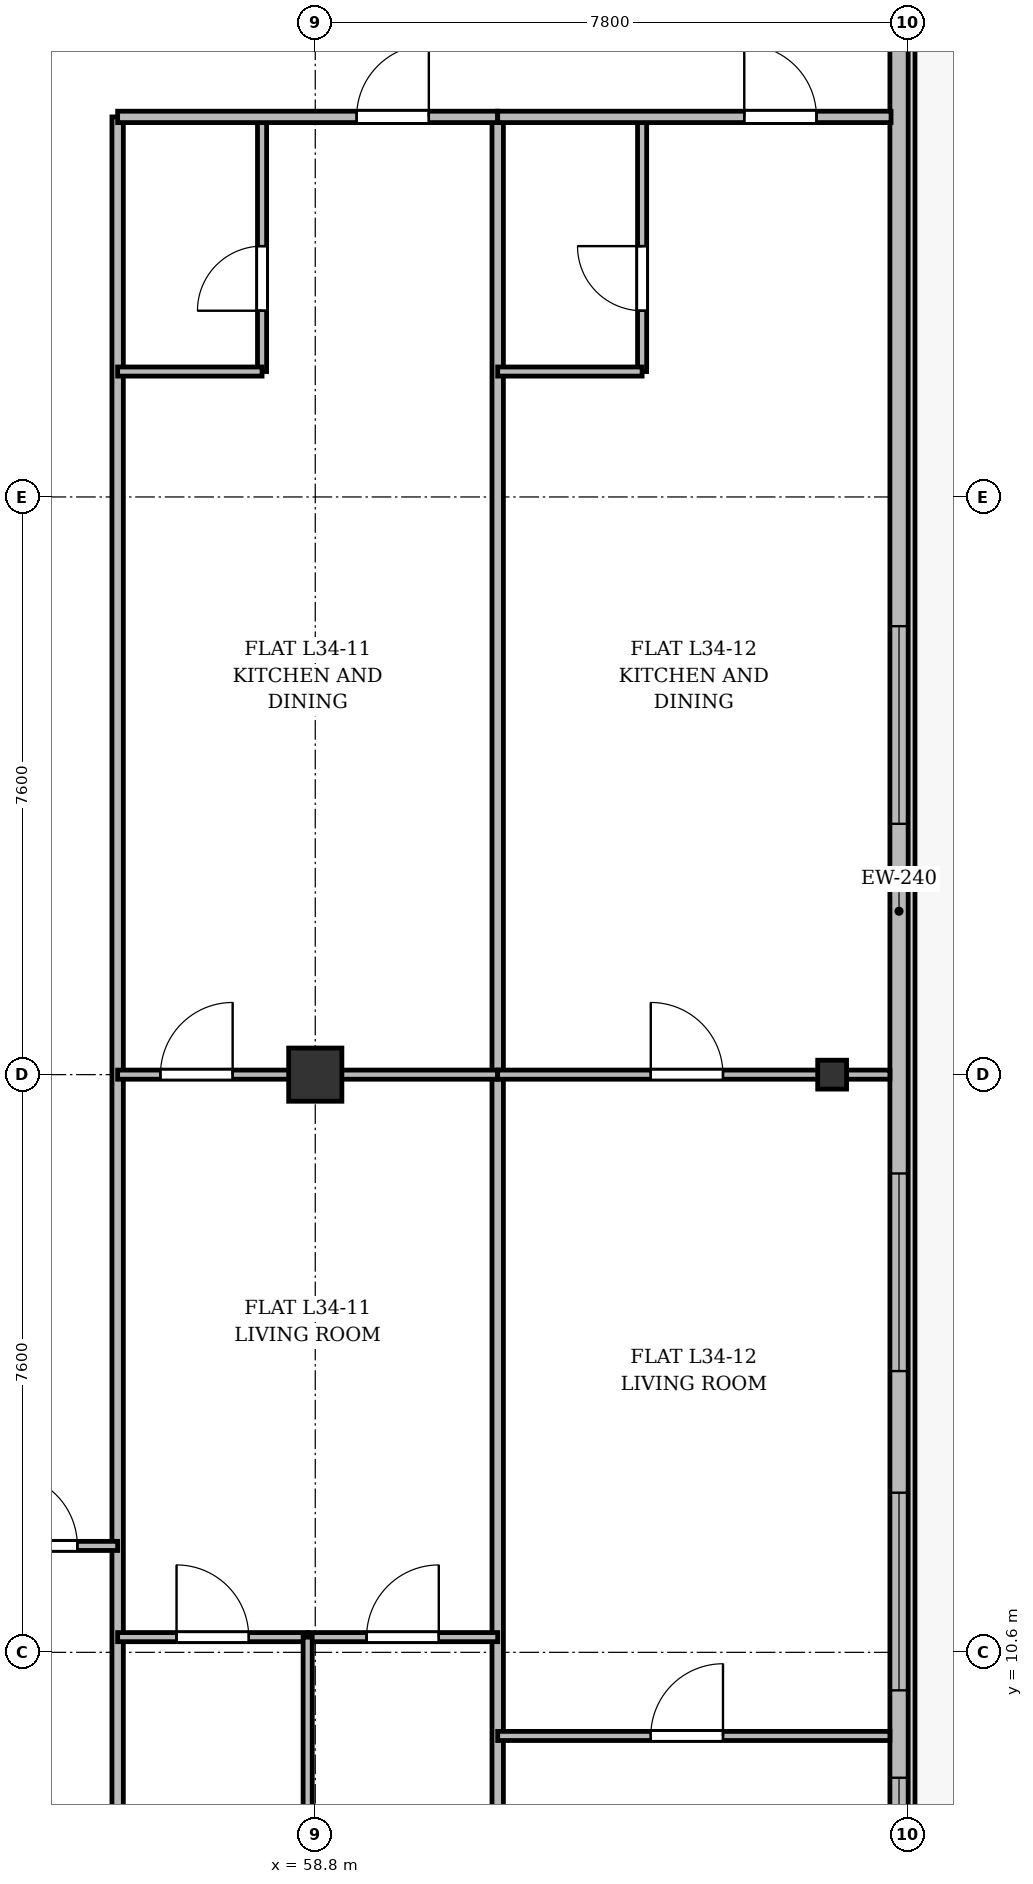
"""IFC4 building model, lengths in metres.
Left out: names, types, materials, properties, quantities, classifications, styles, units other than length and angle.
Written with IfcOpenShell. Run it as: python <this file> out.ifc"""

import sys

from ifc_helpers import new_model, si_unit, direction, frame, frame_2d, origin, origin_2d, place, context, subcontext, project, spatial, rectangle, i_section, extrude, source, transform, mapped, element, fill, save


model = new_model("IFC4")
c1 = context("Model", 3, precision=1e-05, world=origin(), true_north=direction((0.0, 1.0)))
c2 = subcontext(c1, "Body", "Model", "MODEL_VIEW")
j1 = project(units=[si_unit("LENGTHUNIT", "METRE"), si_unit("PLANEANGLEUNIT", "RADIAN")], contexts=[c1])
p1 = place(None, origin())
s1 = spatial("IfcSite", under=j1, at=p1, CompositionType="ELEMENT")
p2 = place(p1, origin())
s2 = spatial("IfcBuilding", under=s1, at=p2, CompositionType="ELEMENT")
p3 = place(p2, frame((0.0, 0.0, 132.1)))
s3 = spatial("IfcBuildingStorey", under=s2, at=p3, CompositionType="ELEMENT", Elevation=132.1)
m1 = source(origin(), c2, "Body", "SweptSolid", [
    extrude(rectangle(XDim=0.7, YDim=0.7, at=origin_2d()), origin(), (0.0, 0.0, 1.0), 3.6),
])
p4 = place(p3, frame((58.8, 18.2, 0.0), z_axis=(0.0, 0.0, 1.0), x_axis=(1.0, 0.0, 0.0)))
e1 = element("IfcColumn", 1, at=p4, inside=s3, PredefinedType="COLUMN", context=c2, shape_type="MappedRepresentation", body=[
    mapped(m1, transform((0.0, 0.0, 0.0), x_axis=(1.0, 0.0, 0.0), y_axis=(0.0, 1.0, 0.0), z_axis=(0.0, 0.0, 1.0), scale=1.0)),
])
m2 = source(origin(), c2, "Body", "SweptSolid", [
    extrude(i_section(OverallWidth=0.38, OverallDepth=0.38, WebThickness=0.02, FlangeThickness=0.03, at=origin_2d()), origin(), (0.0, 0.0, 1.0), 3.6),
])
p5 = place(p3, frame((65.6, 18.2, 0.0), z_axis=(0.0, 0.0, 1.0), x_axis=(1.0, 0.0, 0.0)))
e2 = element("IfcColumn", 2, at=p5, inside=s3, PredefinedType="COLUMN", context=c2, shape_type="MappedRepresentation", body=[
    mapped(m2, transform((0.0, 0.0, 0.0), x_axis=(1.0, 0.0, 0.0), y_axis=(0.0, 1.0, 0.0), z_axis=(0.0, 0.0, 1.0), scale=1.0)),
])
p6 = place(p3, frame((66.48, 45.5, 0.0), z_axis=(0.0, 0.0, 1.0), x_axis=(0.0, -1.0, 0.0)))
e3 = element("IfcWall", 3, at=p6, inside=s3, PredefinedType="SOLIDWALL", context=c2, shape_type="SweptSolid", body=[
    extrude(rectangle(XDim=39.2, YDim=0.24, at=frame_2d((19.6, 0.0))), origin(), (0.0, 0.0, 1.0), 3.35),
])
p7 = place(p6, frame((9.6, 0.0, 0.0)))
e4 = element("IfcOpeningElement", 4, at=p7, cuts=e3, PredefinedType="OPENING", context=c2, shape_type="SweptSolid", body=[
    extrude(rectangle(XDim=1.2, YDim=2.2, at=frame_2d((0.6, 1.1))), frame((0.0, 0.13, 0.0), z_axis=(0.0, -1.0, 0.0), x_axis=(1.0, 0.0, 0.0)), (0.0, 0.0, 1.0), 0.26),
])
p8 = place(p6, frame((36.55, 0.0, 0.92)))
e5 = element("IfcOpeningElement", 5, at=p8, cuts=e3, PredefinedType="OPENING", context=c2, shape_type="SweptSolid", body=[
    extrude(rectangle(XDim=1.2, YDim=1.65, at=frame_2d((0.6, 0.825))), frame((0.0, 0.13, 0.0), z_axis=(0.0, -1.0, 0.0), x_axis=(1.0, 0.0, 0.0)), (0.0, 0.0, 1.0), 0.26),
])
p9 = place(p6, frame((32.8, 0.0, 0.92)))
e6 = element("IfcOpeningElement", 6, at=p9, cuts=e3, PredefinedType="OPENING", context=c2, shape_type="SweptSolid", body=[
    extrude(rectangle(XDim=2.6, YDim=1.9, at=frame_2d((1.3, 0.95))), frame((0.0, 0.13, 0.0), z_axis=(0.0, -1.0, 0.0), x_axis=(1.0, 0.0, 0.0)), (0.0, 0.0, 1.0), 0.26),
])
p10 = place(p6, frame((28.6, 0.0, 0.92)))
e7 = element("IfcOpeningElement", 7, at=p10, cuts=e3, PredefinedType="OPENING", context=c2, shape_type="SweptSolid", body=[
    extrude(rectangle(XDim=2.6, YDim=1.9, at=frame_2d((1.3, 0.95))), frame((0.0, 0.13, 0.0), z_axis=(0.0, -1.0, 0.0), x_axis=(1.0, 0.0, 0.0)), (0.0, 0.0, 1.0), 0.26),
])
p11 = place(p6, frame((21.4, 0.0, 0.92)))
e8 = element("IfcOpeningElement", 8, at=p11, cuts=e3, PredefinedType="OPENING", context=c2, shape_type="SweptSolid", body=[
    extrude(rectangle(XDim=2.6, YDim=1.9, at=frame_2d((1.3, 0.95))), frame((0.0, 0.13, 0.0), z_axis=(0.0, -1.0, 0.0), x_axis=(1.0, 0.0, 0.0)), (0.0, 0.0, 1.0), 0.26),
])
p12 = place(p6, frame((4.5, 0.0, 0.92)))
e9 = element("IfcOpeningElement", 9, at=p12, cuts=e3, PredefinedType="OPENING", context=c2, shape_type="SweptSolid", body=[
    extrude(rectangle(XDim=1.2, YDim=1.65, at=frame_2d((0.6, 0.825))), frame((0.0, 0.13, 0.0), z_axis=(0.0, -1.0, 0.0), x_axis=(1.0, 0.0, 0.0)), (0.0, 0.0, 1.0), 0.26),
])
p13 = place(p6, frame((1.15, 0.0, 0.92)))
e10 = element("IfcOpeningElement", 10, at=p13, cuts=e3, PredefinedType="OPENING", context=c2, shape_type="SweptSolid", body=[
    extrude(rectangle(XDim=1.2, YDim=1.65, at=frame_2d((0.6, 0.825))), frame((0.0, 0.13, 0.0), z_axis=(0.0, -1.0, 0.0), x_axis=(1.0, 0.0, 0.0)), (0.0, 0.0, 1.0), 0.26),
])
for number, where, z_axis, x_axis in (
    (11, (61.2, 3.525, 0.0), (0.0, 0.0, 1.0), (0.0, 1.0, 0.0)),
    (12, (56.2, 3.525, 0.0), (0.0, 0.0, 1.0), (0.0, 1.0, 0.0)),
):
    element("IfcWall", number, at=place(p3, frame(where, z_axis=z_axis, x_axis=x_axis)), inside=s3, PredefinedType="PARTITIONING", context=c2, shape_type="SweptSolid", body=[
        extrude(rectangle(XDim=27.275, YDim=0.15, at=frame_2d((13.638, 0.0))), origin(), (0.0, 0.0, 1.0), 2.75),
    ])
p14 = place(p3, frame((54.2, 12.0, 0.0), z_axis=(0.0, 0.0, 1.0), x_axis=(1.0, 0.0, 0.0)))
e13 = element("IfcWall", 13, at=p14, inside=s3, PredefinedType="PARTITIONING", context=c2, shape_type="SweptSolid", body=[
    extrude(rectangle(XDim=2.0, YDim=0.12, at=frame_2d((1.0, 0.0))), origin(), (0.0, 0.0, 1.0), 3.35),
])
p15 = place(p14, frame((0.52, 0.0, 0.0)))
e14 = element("IfcOpeningElement", 14, at=p15, cuts=e13, PredefinedType="OPENING", context=c2, shape_type="SweptSolid", body=[
    extrude(rectangle(XDim=0.95, YDim=2.15, at=frame_2d((0.475, 1.075))), frame((0.0, 0.07, 0.0), z_axis=(0.0, -1.0, 0.0), x_axis=(1.0, 0.0, 0.0)), (0.0, 0.0, 1.0), 0.14),
])
p16 = place(p3, frame((56.2, 18.2, 0.0), z_axis=(0.0, 0.0, 1.0), x_axis=(1.0, 0.0, 0.0)))
e15 = element("IfcWall", 15, at=p16, inside=s3, PredefinedType="PARTITIONING", context=c2, shape_type="SweptSolid", body=[
    extrude(rectangle(XDim=5.0, YDim=0.12, at=frame_2d((2.5, 0.0))), origin(), (0.0, 0.0, 1.0), 2.75),
])
p17 = place(p16, frame((0.563, 0.0, 0.0)))
e16 = element("IfcOpeningElement", 16, at=p17, cuts=e15, PredefinedType="OPENING", context=c2, shape_type="SweptSolid", body=[
    extrude(rectangle(XDim=0.95, YDim=2.15, at=frame_2d((0.475, 1.075))), frame((0.0, 0.07, 0.0), z_axis=(0.0, -1.0, 0.0), x_axis=(1.0, 0.0, 0.0)), (0.0, 0.0, 1.0), 0.14),
])
p18 = place(p3, frame((58.1, 27.45, 0.0), z_axis=(0.0, 0.0, 1.0), x_axis=(0.0, 1.0, 0.0)))
e17 = element("IfcWall", 17, at=p18, inside=s3, PredefinedType="PARTITIONING", context=c2, shape_type="SweptSolid", body=[
    extrude(rectangle(XDim=3.35, YDim=0.12, at=frame_2d((1.675, 0.0))), origin(), (0.0, 0.0, 1.0), 3.35),
])
p19 = place(p18, frame((0.8, 0.0, 0.0)))
e18 = element("IfcOpeningElement", 18, at=p19, cuts=e17, PredefinedType="OPENING", context=c2, shape_type="SweptSolid", body=[
    extrude(rectangle(XDim=0.85, YDim=2.1, at=frame_2d((0.425, 1.05))), frame((0.0, 0.07, 0.0), z_axis=(0.0, -1.0, 0.0), x_axis=(1.0, 0.0, 0.0)), (0.0, 0.0, 1.0), 0.14),
])
p20 = place(p3, frame((56.2, 27.45, 0.0), z_axis=(0.0, 0.0, 1.0), x_axis=(1.0, 0.0, 0.0)))
e19 = element("IfcWall", 19, at=p20, inside=s3, PredefinedType="PARTITIONING", context=c2, shape_type="SweptSolid", body=[
    extrude(rectangle(XDim=1.9, YDim=0.12, at=frame_2d((0.95, 0.0))), origin(), (0.0, 0.0, 1.0), 3.35),
])
p21 = place(p3, frame((56.2, 30.8, 0.0), z_axis=(0.0, 0.0, 1.0), x_axis=(1.0, 0.0, 0.0)))
e20 = element("IfcWall", 20, at=p21, inside=s3, PredefinedType="PARTITIONING", context=c2, shape_type="SweptSolid", body=[
    extrude(rectangle(XDim=5.0, YDim=0.15, at=frame_2d((2.5, 0.0))), origin(), (0.0, 0.0, 1.0), 2.85),
])
p22 = place(p21, frame((3.144, 0.0, 0.0)))
e21 = element("IfcOpeningElement", 21, at=p22, cuts=e20, PredefinedType="OPENING", context=c2, shape_type="SweptSolid", body=[
    extrude(rectangle(XDim=0.95, YDim=2.15, at=frame_2d((0.475, 1.075))), frame((0.0, 0.085, 0.0), z_axis=(0.0, -1.0, 0.0), x_axis=(1.0, 0.0, 0.0)), (0.0, 0.0, 1.0), 0.17),
])
p23 = place(p3, frame((56.2, 10.8, 0.0), z_axis=(0.0, 0.0, 1.0), x_axis=(1.0, 0.0, 0.0)))
e22 = element("IfcWall", 22, at=p23, inside=s3, PredefinedType="PARTITIONING", context=c2, shape_type="SweptSolid", body=[
    extrude(rectangle(XDim=2.5, YDim=0.12, at=frame_2d((1.25, 0.0))), origin(), (0.0, 0.0, 1.0), 3.0),
])
p24 = place(p23, frame((0.775, 0.0, 0.0)))
e23 = element("IfcOpeningElement", 23, at=p24, cuts=e22, PredefinedType="OPENING", context=c2, shape_type="SweptSolid", body=[
    extrude(rectangle(XDim=0.95, YDim=2.15, at=frame_2d((0.475, 1.075))), frame((0.0, 0.07, 0.0), z_axis=(0.0, -1.0, 0.0), x_axis=(1.0, 0.0, 0.0)), (0.0, 0.0, 1.0), 0.14),
])
p25 = place(p3, frame((58.7, 10.8, 0.0), z_axis=(0.0, 0.0, 1.0), x_axis=(1.0, 0.0, 0.0)))
e24 = element("IfcWall", 24, at=p25, inside=s3, PredefinedType="PARTITIONING", context=c2, shape_type="SweptSolid", body=[
    extrude(rectangle(XDim=2.5, YDim=0.12, at=frame_2d((1.25, 0.0))), origin(), (0.0, 0.0, 1.0), 2.85),
])
p26 = place(p25, frame((0.775, 0.0, 0.0)))
e25 = element("IfcOpeningElement", 25, at=p26, cuts=e24, PredefinedType="OPENING", context=c2, shape_type="SweptSolid", body=[
    extrude(rectangle(XDim=0.95, YDim=2.15, at=frame_2d((0.475, 1.075))), frame((0.0, 0.07, 0.0), z_axis=(0.0, -1.0, 0.0), x_axis=(1.0, 0.0, 0.0)), (0.0, 0.0, 1.0), 0.14),
])
p27 = place(p3, frame((58.7, 3.525, 0.0), z_axis=(0.0, 0.0, 1.0), x_axis=(0.0, 1.0, 0.0)))
e26 = element("IfcWall", 26, at=p27, inside=s3, PredefinedType="PARTITIONING", context=c2, shape_type="SweptSolid", body=[
    extrude(rectangle(XDim=7.275, YDim=0.12, at=frame_2d((3.638, 0.0))), origin(), (0.0, 0.0, 1.0), 2.75),
])
p28 = place(p3, frame((61.2, 18.2, 0.0), z_axis=(0.0, 0.0, 1.0), x_axis=(1.0, 0.0, 0.0)))
e27 = element("IfcWall", 27, at=p28, inside=s3, PredefinedType="PARTITIONING", context=c2, shape_type="SweptSolid", body=[
    extrude(rectangle(XDim=5.16, YDim=0.12, at=frame_2d((2.58, 0.0))), origin(), (0.0, 0.0, 1.0), 2.75),
])
p29 = place(p28, frame((2.014, 0.0, 0.0)))
e28 = element("IfcOpeningElement", 28, at=p29, cuts=e27, PredefinedType="OPENING", context=c2, shape_type="SweptSolid", body=[
    extrude(rectangle(XDim=0.95, YDim=2.15, at=frame_2d((0.475, 1.075))), frame((0.0, 0.07, 0.0), z_axis=(0.0, -1.0, 0.0), x_axis=(1.0, 0.0, 0.0)), (0.0, 0.0, 1.0), 0.14),
])
p30 = place(p3, frame((63.1, 27.45, 0.0), z_axis=(0.0, 0.0, 1.0), x_axis=(0.0, 1.0, 0.0)))
e29 = element("IfcWall", 29, at=p30, inside=s3, PredefinedType="PARTITIONING", context=c2, shape_type="SweptSolid", body=[
    extrude(rectangle(XDim=3.35, YDim=0.12, at=frame_2d((1.675, 0.0))), origin(), (0.0, 0.0, 1.0), 3.35),
])
p31 = place(p30, frame((0.8, 0.0, 0.0)))
e30 = element("IfcOpeningElement", 30, at=p31, cuts=e29, PredefinedType="OPENING", context=c2, shape_type="SweptSolid", body=[
    extrude(rectangle(XDim=0.85, YDim=2.1, at=frame_2d((0.425, 1.05))), frame((0.0, 0.07, 0.0), z_axis=(0.0, -1.0, 0.0), x_axis=(1.0, 0.0, 0.0)), (0.0, 0.0, 1.0), 0.14),
])
p32 = place(p3, frame((61.2, 27.45, 0.0), z_axis=(0.0, 0.0, 1.0), x_axis=(1.0, 0.0, 0.0)))
e31 = element("IfcWall", 31, at=p32, inside=s3, PredefinedType="PARTITIONING", context=c2, shape_type="SweptSolid", body=[
    extrude(rectangle(XDim=1.9, YDim=0.12, at=frame_2d((0.95, 0.0))), origin(), (0.0, 0.0, 1.0), 3.35),
])
p33 = place(p3, frame((61.2, 30.8, 0.0), z_axis=(0.0, 0.0, 1.0), x_axis=(1.0, 0.0, 0.0)))
e32 = element("IfcWall", 32, at=p33, inside=s3, PredefinedType="PARTITIONING", context=c2, shape_type="SweptSolid", body=[
    extrude(rectangle(XDim=5.175, YDim=0.15, at=frame_2d((2.587, 0.0))), origin(), (0.0, 0.0, 1.0), 2.85),
])
p34 = place(p33, frame((3.244, 0.0, 0.0)))
e33 = element("IfcOpeningElement", 33, at=p34, cuts=e32, PredefinedType="OPENING", context=c2, shape_type="SweptSolid", body=[
    extrude(rectangle(XDim=0.95, YDim=2.15, at=frame_2d((0.475, 1.075))), frame((0.0, 0.085, 0.0), z_axis=(0.0, -1.0, 0.0), x_axis=(1.0, 0.0, 0.0)), (0.0, 0.0, 1.0), 0.17),
])
p35 = place(p3, frame((61.2, 9.5, 0.0), z_axis=(0.0, 0.0, 1.0), x_axis=(1.0, 0.0, 0.0)))
e34 = element("IfcWall", 34, at=p35, inside=s3, PredefinedType="PARTITIONING", context=c2, shape_type="SweptSolid", body=[
    extrude(rectangle(XDim=5.16, YDim=0.12, at=frame_2d((2.58, 0.0))), origin(), (0.0, 0.0, 1.0), 2.85),
])
p36 = place(p35, frame((2.014, 0.0, 0.0)))
e35 = element("IfcOpeningElement", 35, at=p36, cuts=e34, PredefinedType="OPENING", context=c2, shape_type="SweptSolid", body=[
    extrude(rectangle(XDim=0.95, YDim=2.15, at=frame_2d((0.475, 1.075))), frame((0.0, 0.07, 0.0), z_axis=(0.0, -1.0, 0.0), x_axis=(1.0, 0.0, 0.0)), (0.0, 0.0, 1.0), 0.14),
])
m3 = source(origin(), c2, "Body", "SweptSolid", [
    extrude(rectangle(XDim=1.2, YDim=1.65, at=frame_2d((0.6, 0.825))), frame((0.0, 0.03, 0.0), z_axis=(0.0, -1.0, 0.0), x_axis=(1.0, 0.0, 0.0)), (0.0, 0.0, 1.0), 0.06),
])
p37 = place(p8, origin())
e36 = element("IfcWindow", 36, at=p37, inside=s3, PartitioningType="SINGLE_PANEL", PredefinedType="WINDOW", context=c2, shape_type="MappedRepresentation", body=[
    mapped(m3, transform((0.0, 0.0, 0.0), x_axis=(1.0, 0.0, 0.0), y_axis=(0.0, 1.0, 0.0), z_axis=(0.0, 0.0, 1.0), scale=1.0)),
])
fill(e5, e36)
m4 = source(origin(), c2, "Body", "SweptSolid", [
    extrude(rectangle(XDim=2.6, YDim=1.9, at=frame_2d((1.3, 0.95))), frame((0.0, 0.03, 0.0), z_axis=(0.0, -1.0, 0.0), x_axis=(1.0, 0.0, 0.0)), (0.0, 0.0, 1.0), 0.06),
])
p38 = place(p9, origin())
e37 = element("IfcWindow", 37, at=p38, inside=s3, PartitioningType="SINGLE_PANEL", PredefinedType="WINDOW", context=c2, shape_type="MappedRepresentation", body=[
    mapped(m4, transform((0.0, 0.0, 0.0), x_axis=(1.0, 0.0, 0.0), y_axis=(0.0, 1.0, 0.0), z_axis=(0.0, 0.0, 1.0), scale=1.0)),
])
fill(e6, e37)
p39 = place(p10, origin())
e38 = element("IfcWindow", 38, at=p39, inside=s3, PartitioningType="SINGLE_PANEL", PredefinedType="WINDOW", context=c2, shape_type="MappedRepresentation", body=[
    mapped(m4, transform((0.0, 0.0, 0.0), x_axis=(1.0, 0.0, 0.0), y_axis=(0.0, 1.0, 0.0), z_axis=(0.0, 0.0, 1.0), scale=1.0)),
])
fill(e7, e38)
p40 = place(p11, origin())
e39 = element("IfcWindow", 39, at=p40, inside=s3, PartitioningType="SINGLE_PANEL", PredefinedType="WINDOW", context=c2, shape_type="MappedRepresentation", body=[
    mapped(m4, transform((0.0, 0.0, 0.0), x_axis=(1.0, 0.0, 0.0), y_axis=(0.0, 1.0, 0.0), z_axis=(0.0, 0.0, 1.0), scale=1.0)),
])
fill(e8, e39)
m5 = source(origin(), c2, "Body", "SweptSolid", [
    extrude(rectangle(XDim=0.95, YDim=2.15, at=frame_2d((0.475, 1.075))), frame((0.0, 0.025, 0.0), z_axis=(0.0, -1.0, 0.0), x_axis=(1.0, 0.0, 0.0)), (0.0, 0.0, 1.0), 0.05),
])
p41 = place(p15, origin())
e40 = element("IfcDoor", 40, at=p41, inside=s3, OperationType="SINGLE_SWING_LEFT", PredefinedType="DOOR", context=c2, shape_type="MappedRepresentation", body=[
    mapped(m5, transform((0.0, 0.0, 0.0), x_axis=(1.0, 0.0, 0.0), y_axis=(0.0, 1.0, 0.0), z_axis=(0.0, 0.0, 1.0), scale=1.0)),
])
fill(e14, e40)
p42 = place(p17, origin())
e41 = element("IfcDoor", 41, at=p42, inside=s3, OperationType="SINGLE_SWING_RIGHT", PredefinedType="DOOR", context=c2, shape_type="MappedRepresentation", body=[
    mapped(m5, transform((0.0, 0.0, 0.0), x_axis=(1.0, 0.0, 0.0), y_axis=(0.0, 1.0, 0.0), z_axis=(0.0, 0.0, 1.0), scale=1.0)),
])
fill(e16, e41)
m6 = source(origin(), c2, "Body", "SweptSolid", [
    extrude(rectangle(XDim=0.85, YDim=2.1, at=frame_2d((0.425, 1.05))), frame((0.0, 0.025, 0.0), z_axis=(0.0, -1.0, 0.0), x_axis=(1.0, 0.0, 0.0)), (0.0, 0.0, 1.0), 0.05),
])
p43 = place(p19, origin())
e42 = element("IfcDoor", 42, at=p43, inside=s3, OperationType="SINGLE_SWING_LEFT", PredefinedType="DOOR", context=c2, shape_type="MappedRepresentation", body=[
    mapped(m6, transform((0.0, 0.0, 0.0), x_axis=(1.0, 0.0, 0.0), y_axis=(0.0, 1.0, 0.0), z_axis=(0.0, 0.0, 1.0), scale=1.0)),
])
fill(e18, e42)
p44 = place(p22, origin())
e43 = element("IfcDoor", 43, at=p44, inside=s3, OperationType="SINGLE_SWING_RIGHT", PredefinedType="DOOR", context=c2, shape_type="MappedRepresentation", body=[
    mapped(m5, transform((0.0, 0.0, 0.0), x_axis=(1.0, 0.0, 0.0), y_axis=(0.0, 1.0, 0.0), z_axis=(0.0, 0.0, 1.0), scale=1.0)),
])
fill(e21, e43)
p45 = place(p24, origin())
e44 = element("IfcDoor", 44, at=p45, inside=s3, OperationType="SINGLE_SWING_LEFT", PredefinedType="DOOR", context=c2, shape_type="MappedRepresentation", body=[
    mapped(m5, transform((0.0, 0.0, 0.0), x_axis=(1.0, 0.0, 0.0), y_axis=(0.0, 1.0, 0.0), z_axis=(0.0, 0.0, 1.0), scale=1.0)),
])
fill(e23, e44)
p46 = place(p26, origin())
e45 = element("IfcDoor", 45, at=p46, inside=s3, OperationType="SINGLE_SWING_RIGHT", PredefinedType="DOOR", context=c2, shape_type="MappedRepresentation", body=[
    mapped(m5, transform((0.0, 0.0, 0.0), x_axis=(1.0, 0.0, 0.0), y_axis=(0.0, 1.0, 0.0), z_axis=(0.0, 0.0, 1.0), scale=1.0)),
])
fill(e25, e45)
p47 = place(p29, origin())
e46 = element("IfcDoor", 46, at=p47, inside=s3, OperationType="SINGLE_SWING_LEFT", PredefinedType="DOOR", context=c2, shape_type="MappedRepresentation", body=[
    mapped(m5, transform((0.0, 0.0, 0.0), x_axis=(1.0, 0.0, 0.0), y_axis=(0.0, 1.0, 0.0), z_axis=(0.0, 0.0, 1.0), scale=1.0)),
])
fill(e28, e46)
p48 = place(p31, origin())
e47 = element("IfcDoor", 47, at=p48, inside=s3, OperationType="SINGLE_SWING_RIGHT", PredefinedType="DOOR", context=c2, shape_type="MappedRepresentation", body=[
    mapped(m6, transform((0.0, 0.0, 0.0), x_axis=(1.0, 0.0, 0.0), y_axis=(0.0, 1.0, 0.0), z_axis=(0.0, 0.0, 1.0), scale=1.0)),
])
fill(e30, e47)
p49 = place(p34, origin())
e48 = element("IfcDoor", 48, at=p49, inside=s3, OperationType="SINGLE_SWING_LEFT", PredefinedType="DOOR", context=c2, shape_type="MappedRepresentation", body=[
    mapped(m5, transform((0.0, 0.0, 0.0), x_axis=(1.0, 0.0, 0.0), y_axis=(0.0, 1.0, 0.0), z_axis=(0.0, 0.0, 1.0), scale=1.0)),
])
fill(e33, e48)
p50 = place(p36, origin())
e49 = element("IfcDoor", 49, at=p50, inside=s3, OperationType="SINGLE_SWING_RIGHT", PredefinedType="DOOR", context=c2, shape_type="MappedRepresentation", body=[
    mapped(m5, transform((0.0, 0.0, 0.0), x_axis=(1.0, 0.0, 0.0), y_axis=(0.0, 1.0, 0.0), z_axis=(0.0, 0.0, 1.0), scale=1.0)),
])
fill(e35, e49)
save(model, sys.argv[1])
